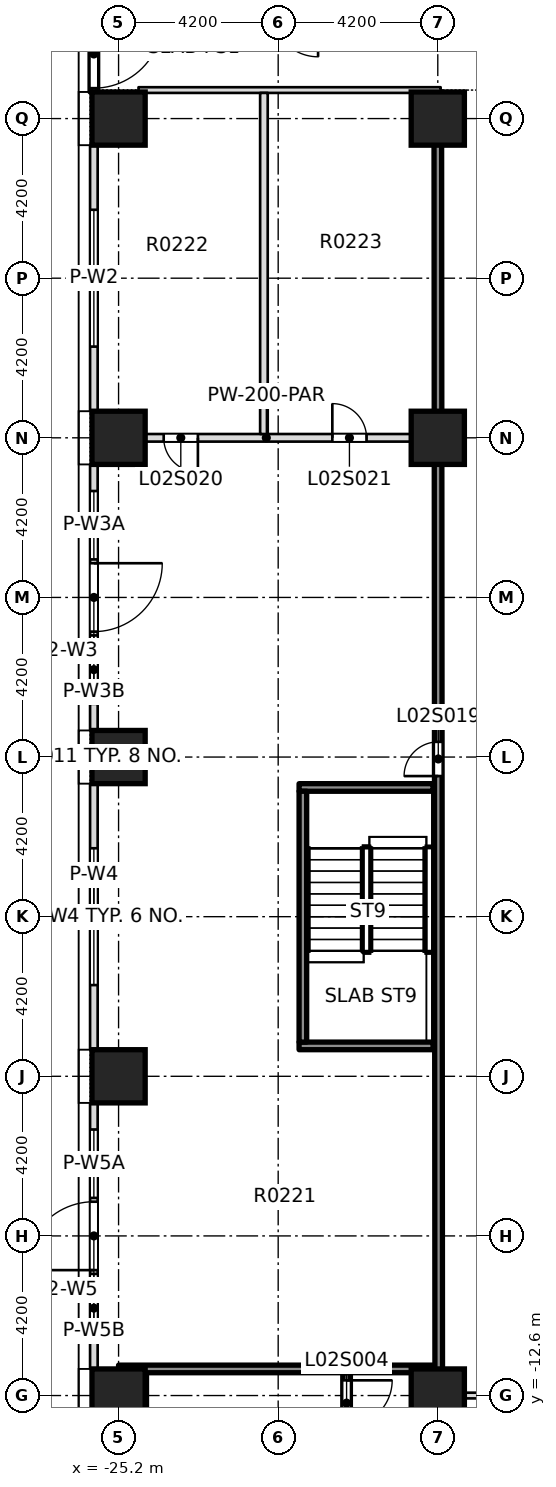
"""IFC4 building model, lengths in metres.
Left out: names, types, materials, properties, quantities, classifications, styles, units other than length and angle.
Written with IfcOpenShell. Run it as: python <this file> out.ifc"""

import sys

from ifc_helpers import new_model, si_unit, direction, frame, frame_2d, origin, origin_2d, place, context, subcontext, project, spatial, rectangle, extrude, element, fill, save


model = new_model("IFC4")
c1 = context("Model", 3, precision=1e-05, world=origin(), true_north=direction((0.0, 1.0)))
c2 = subcontext(c1, "Body", "Model", "MODEL_VIEW")
j1 = project(units=[si_unit("LENGTHUNIT", "METRE"), si_unit("PLANEANGLEUNIT", "RADIAN")], contexts=[c1])
p1 = place(None, origin())
s1 = spatial("IfcSite", under=j1, at=p1, CompositionType="ELEMENT")
p2 = place(p1, origin())
s2 = spatial("IfcBuilding", under=s1, at=p2, CompositionType="ELEMENT")
p3 = place(p2, frame((0.0, 0.0, 12.5)))
s3 = spatial("IfcBuildingStorey", under=s2, at=p3, CompositionType="ELEMENT", Elevation=12.5)
for number, where, z_axis, x_axis in (
    (1, (-25.2, -12.6, -0.4), (0.0, 0.0, 1.0), (1.0, 0.0, 0.0)),
    (2, (-16.8, -12.6, -0.4), (0.0, 0.0, 1.0), (1.0, 0.0, 0.0)),
    (3, (-25.2, -4.2, -0.4), (0.0, 0.0, 1.0), (1.0, 0.0, 0.0)),
    (4, (-25.2, 4.2, -0.4), (0.0, 0.0, 1.0), (1.0, 0.0, 0.0)),
    (5, (-25.2, 12.6, -0.4), (0.0, 0.0, 1.0), (1.0, 0.0, 0.0)),
    (6, (-16.8, 12.6, -0.4), (0.0, 0.0, 1.0), (1.0, 0.0, 0.0)),
    (7, (-16.8, 21.0, -0.4), (0.0, 0.0, 1.0), (1.0, 0.0, 0.0)),
    (8, (-25.2, 21.0, 0.0), (0.0, 0.0, 1.0), (1.0, 0.0, 0.0)),
):
    element("IfcColumn", number, at=place(p3, frame(where, z_axis=z_axis, x_axis=x_axis)), inside=s3, PredefinedType="COLUMN", context=c2, shape_type="SweptSolid", body=[
        extrude(rectangle(XDim=1.4, YDim=1.4, at=origin_2d()), origin(), (0.0, 0.0, 1.0), 7.5),
    ])
p4 = place(p3, frame((-16.9, -12.6, 0.0), z_axis=(0.0, 0.0, 1.0), x_axis=(1.0, 0.0, 0.0)))
e9 = element("IfcWall", 9, at=p4, inside=s3, PredefinedType="PARTITIONING", context=c2, shape_type="SweptSolid", body=[
    extrude(rectangle(XDim=9.625, YDim=0.15, at=frame_2d((4.812, 0.0))), origin(), (0.0, 0.0, 1.0), 7.1),
])
p5 = place(p3, frame((-25.2, -11.9, 0.0), z_axis=(0.0, 0.0, 1.0), x_axis=(1.0, 0.0, 0.0)))
e10 = element("IfcWall", 10, at=p5, inside=s3, PredefinedType="SOLIDWALL", context=c2, shape_type="SweptSolid", body=[
    extrude(rectangle(XDim=8.325, YDim=0.2, at=frame_2d((4.163, 0.0))), origin(), (0.0, 0.0, 1.0), 7.1),
])
p6 = place(p3, frame((-25.75, 12.6, 0.0), z_axis=(0.0, 0.0, 1.0), x_axis=(1.0, 0.0, 0.0)))
e11 = element("IfcWall", 11, at=p6, inside=s3, PredefinedType="PARTITIONING", context=c2, shape_type="SweptSolid", body=[
    extrude(rectangle(XDim=8.875, YDim=0.2, at=frame_2d((4.438, 0.0))), origin(), (0.0, 0.0, 1.0), 7.1),
])
p7 = place(p6, frame((1.738, 0.0, 0.0)))
e12 = element("IfcOpeningElement", 12, at=p7, cuts=e11, PredefinedType="OPENING", context=c2, shape_type="SweptSolid", body=[
    extrude(rectangle(XDim=0.9, YDim=2.1, at=frame_2d((0.45, 1.05))), frame((0.0, 0.11, 0.0), z_axis=(0.0, -1.0, 0.0), x_axis=(1.0, 0.0, 0.0)), (0.0, 0.0, 1.0), 0.22),
])
p8 = place(p6, frame((6.175, 0.0, 0.0)))
e13 = element("IfcOpeningElement", 13, at=p8, cuts=e11, PredefinedType="OPENING", context=c2, shape_type="SweptSolid", body=[
    extrude(rectangle(XDim=0.9, YDim=2.1, at=frame_2d((0.45, 1.05))), frame((0.0, 0.11, 0.0), z_axis=(0.0, -1.0, 0.0), x_axis=(1.0, 0.0, 0.0)), (0.0, 0.0, 1.0), 0.22),
])
p9 = place(p3, frame((-24.675, 21.75, 0.0), z_axis=(0.0, 0.0, 1.0), x_axis=(1.0, 0.0, 0.0)))
e14 = element("IfcWall", 14, at=p9, inside=s3, PredefinedType="PARTITIONING", context=c2, shape_type="SweptSolid", body=[
    extrude(rectangle(XDim=7.95, YDim=0.15, at=frame_2d((3.975, 0.0))), origin(), (0.0, 0.0, 1.0), 7.1),
])
p10 = place(p3, frame((-21.375, 12.7, 0.0), z_axis=(0.0, 0.0, 1.0), x_axis=(0.0, 1.0, 0.0)))
e15 = element("IfcWall", 15, at=p10, inside=s3, PredefinedType="PARTITIONING", context=c2, shape_type="SweptSolid", body=[
    extrude(rectangle(XDim=8.975, YDim=0.2, at=frame_2d((4.488, 0.0))), origin(), (0.0, 0.0, 1.0), 7.1),
])
p11 = place(p3, frame((-19.2, -18.125, 0.0), z_axis=(0.0, 0.0, 1.0), x_axis=(0.0, 1.0, 0.0)))
e16 = element("IfcWall", 16, at=p11, inside=s3, PredefinedType="SOLIDWALL", context=c2, shape_type="SweptSolid", body=[
    extrude(rectangle(XDim=6.125, YDim=0.2, at=frame_2d((3.062, 0.0))), origin(), (0.0, 0.0, 1.0), 7.1),
])
p12 = place(p11, frame((4.725, 0.0, 0.0)))
e17 = element("IfcOpeningElement", 17, at=p12, cuts=e16, PredefinedType="OPENING", context=c2, shape_type="SweptSolid", body=[
    extrude(rectangle(XDim=1.2, YDim=2.1, at=frame_2d((0.6, 1.05))), frame((0.0, 0.11, 0.0), z_axis=(0.0, -1.0, 0.0), x_axis=(1.0, 0.0, 0.0)), (0.0, 0.0, 1.0), 0.22),
])
p13 = place(p3, frame((-16.8, -18.125, 0.0), z_axis=(0.0, 0.0, 1.0), x_axis=(0.0, 1.0, 0.0)))
e18 = element("IfcWall", 18, at=p13, inside=s3, PredefinedType="PARTITIONING", context=c2, shape_type="SweptSolid", body=[
    extrude(rectangle(XDim=5.45, YDim=0.2, at=frame_2d((2.725, 0.0))), origin(), (0.0, 0.0, 1.0), 7.1),
])
p14 = place(p3, frame((-16.775, -12.525, 0.0), z_axis=(0.0, 0.0, 1.0), x_axis=(-0.000727609751, 0.999999735292, 0.0)))
e19 = element("IfcWall", 19, at=p14, inside=s3, PredefinedType="SOLIDWALL", context=c2, shape_type="SweptSolid", body=[
    extrude(rectangle(XDim=34.225, YDim=0.2, at=frame_2d((17.112, 0.0))), origin(), (0.0, 0.0, 1.0), 7.1),
])
p15 = place(p14, frame((16.225, 0.0, 0.0)))
e20 = element("IfcOpeningElement", 20, at=p15, cuts=e19, PredefinedType="OPENING", context=c2, shape_type="SweptSolid", body=[
    extrude(rectangle(XDim=0.9, YDim=2.1, at=frame_2d((0.45, 1.05))), frame((0.0, 0.11, 0.0), z_axis=(0.0, -1.0, 0.0), x_axis=(1.0, 0.0, 0.0)), (0.0, 0.0, 1.0), 0.22),
])
p16 = place(p3, frame((-25.85, 21.7, 0.0), z_axis=(0.0, 0.0, 1.0), x_axis=(0.0, 1.0, 0.0)))
e21 = element("IfcWall", 21, at=p16, inside=s3, PredefinedType="SOLIDWALL", context=c2, shape_type="SweptSolid", body=[
    extrude(rectangle(XDim=7.0, YDim=0.2, at=frame_2d((3.5, 0.0))), origin(), (0.0, 0.0, 1.0), 7.1),
])
p17 = place(p16, frame((0.1, 0.0, 0.0)))
e22 = element("IfcOpeningElement", 22, at=p17, cuts=e21, PredefinedType="OPENING", context=c2, shape_type="SweptSolid", body=[
    extrude(rectangle(XDim=1.8, YDim=2.4, at=frame_2d((0.9, 1.2))), frame((0.0, 0.11, 0.0), z_axis=(0.0, -1.0, 0.0), x_axis=(1.0, 0.0, 0.0)), (0.0, 0.0, 1.0), 0.22),
])
p18 = place(p16, frame((3.9, 0.0, 0.9)))
e23 = element("IfcOpeningElement", 23, at=p18, cuts=e21, PredefinedType="OPENING", context=c2, shape_type="SweptSolid", body=[
    extrude(rectangle(XDim=1.8, YDim=4.2, at=frame_2d((0.9, 2.1))), frame((0.0, 0.11, 0.0), z_axis=(0.0, -1.0, 0.0), x_axis=(1.0, 0.0, 0.0)), (0.0, 0.0, 1.0), 0.22),
])
p19 = place(p3, frame((-25.85, 20.3, 0.0), z_axis=(0.0, 0.0, 1.0), x_axis=(0.0, -1.0, 0.0)))
e24 = element("IfcWall", 24, at=p19, inside=s3, PredefinedType="STANDARD", context=c2, shape_type="SweptSolid", body=[
    extrude(rectangle(XDim=7.0, YDim=0.2, at=frame_2d((3.5, 0.0))), origin(), (0.0, 0.0, 1.0), 7.1),
])
p20 = place(p19, frame((1.7, 0.0, 0.9)))
e25 = element("IfcOpeningElement", 25, at=p20, cuts=e24, PredefinedType="OPENING", context=c2, shape_type="SweptSolid", body=[
    extrude(rectangle(XDim=3.6, YDim=4.2, at=frame_2d((1.8, 2.1))), frame((0.0, 0.11, 0.0), z_axis=(0.0, -1.0, 0.0), x_axis=(1.0, 0.0, 0.0)), (0.0, 0.0, 1.0), 0.22),
])
p21 = place(p3, frame((-25.85, 11.9, 0.0), z_axis=(0.0, 0.0, 1.0), x_axis=(0.0, -1.0, 0.0)))
e26 = element("IfcWall", 26, at=p21, inside=s3, PredefinedType="STANDARD", context=c2, shape_type="SweptSolid", body=[
    extrude(rectangle(XDim=7.0, YDim=0.2, at=frame_2d((3.5, 0.0))), origin(), (0.0, 0.0, 1.0), 7.1),
])
p22 = place(p21, frame((0.7, 0.0, 0.9)))
e27 = element("IfcOpeningElement", 27, at=p22, cuts=e26, PredefinedType="OPENING", context=c2, shape_type="SweptSolid", body=[
    extrude(rectangle(XDim=1.8, YDim=4.2, at=frame_2d((0.9, 2.1))), frame((0.0, 0.11, 0.0), z_axis=(0.0, -1.0, 0.0), x_axis=(1.0, 0.0, 0.0)), (0.0, 0.0, 1.0), 0.22),
])
p23 = place(p21, frame((2.6, 0.0, 0.0)))
e28 = element("IfcOpeningElement", 28, at=p23, cuts=e26, PredefinedType="OPENING", context=c2, shape_type="SweptSolid", body=[
    extrude(rectangle(XDim=1.8, YDim=2.4, at=frame_2d((0.9, 1.2))), frame((0.0, 0.11, 0.0), z_axis=(0.0, -1.0, 0.0), x_axis=(1.0, 0.0, 0.0)), (0.0, 0.0, 1.0), 0.22),
])
p24 = place(p21, frame((4.5, 0.0, 0.9)))
e29 = element("IfcOpeningElement", 29, at=p24, cuts=e26, PredefinedType="OPENING", context=c2, shape_type="SweptSolid", body=[
    extrude(rectangle(XDim=1.8, YDim=4.2, at=frame_2d((0.9, 2.1))), frame((0.0, 0.11, 0.0), z_axis=(0.0, -1.0, 0.0), x_axis=(1.0, 0.0, 0.0)), (0.0, 0.0, 1.0), 0.22),
])
p25 = place(p3, frame((-25.85, 3.5, 0.0), z_axis=(0.0, 0.0, 1.0), x_axis=(0.0, -1.0, 0.0)))
e30 = element("IfcWall", 30, at=p25, inside=s3, PredefinedType="STANDARD", context=c2, shape_type="SweptSolid", body=[
    extrude(rectangle(XDim=7.0, YDim=0.2, at=frame_2d((3.5, 0.0))), origin(), (0.0, 0.0, 1.0), 7.1),
])
p26 = place(p25, frame((1.7, 0.0, 0.9)))
e31 = element("IfcOpeningElement", 31, at=p26, cuts=e30, PredefinedType="OPENING", context=c2, shape_type="SweptSolid", body=[
    extrude(rectangle(XDim=3.6, YDim=4.2, at=frame_2d((1.8, 2.1))), frame((0.0, 0.11, 0.0), z_axis=(0.0, -1.0, 0.0), x_axis=(1.0, 0.0, 0.0)), (0.0, 0.0, 1.0), 0.22),
])
p27 = place(p3, frame((-25.85, -4.9, 0.0), z_axis=(0.0, 0.0, 1.0), x_axis=(0.0, -1.0, 0.0)))
e32 = element("IfcWall", 32, at=p27, inside=s3, PredefinedType="STANDARD", context=c2, shape_type="SweptSolid", body=[
    extrude(rectangle(XDim=7.0, YDim=0.2, at=frame_2d((3.5, 0.0))), origin(), (0.0, 0.0, 1.0), 7.1),
])
p28 = place(p27, frame((0.7, 0.0, 0.9)))
e33 = element("IfcOpeningElement", 33, at=p28, cuts=e32, PredefinedType="OPENING", context=c2, shape_type="SweptSolid", body=[
    extrude(rectangle(XDim=1.8, YDim=4.2, at=frame_2d((0.9, 2.1))), frame((0.0, 0.11, 0.0), z_axis=(0.0, -1.0, 0.0), x_axis=(1.0, 0.0, 0.0)), (0.0, 0.0, 1.0), 0.22),
])
p29 = place(p27, frame((2.6, 0.0, 0.0)))
e34 = element("IfcOpeningElement", 34, at=p29, cuts=e32, PredefinedType="OPENING", context=c2, shape_type="SweptSolid", body=[
    extrude(rectangle(XDim=1.8, YDim=2.4, at=frame_2d((0.9, 1.2))), frame((0.0, 0.11, 0.0), z_axis=(0.0, -1.0, 0.0), x_axis=(1.0, 0.0, 0.0)), (0.0, 0.0, 1.0), 0.22),
])
p30 = place(p27, frame((4.5, 0.0, 0.9)))
e35 = element("IfcOpeningElement", 35, at=p30, cuts=e32, PredefinedType="OPENING", context=c2, shape_type="SweptSolid", body=[
    extrude(rectangle(XDim=1.8, YDim=4.2, at=frame_2d((0.9, 2.1))), frame((0.0, 0.11, 0.0), z_axis=(0.0, -1.0, 0.0), x_axis=(1.0, 0.0, 0.0)), (0.0, 0.0, 1.0), 0.22),
])
for number, where, z_axis, x_axis in (
    (36, (-20.45, -3.4, 0.0), (0.0, 0.0, 1.0), (1.0, 0.0, 0.0)),
    (37, (-20.45, 3.4, 0.0), (0.0, 0.0, 1.0), (1.0, 0.0, 0.0)),
):
    element("IfcWall", number, at=place(p3, frame(where, z_axis=z_axis, x_axis=x_axis)), inside=s3, PredefinedType="SOLIDWALL", context=c2, shape_type="SweptSolid", body=[
        extrude(rectangle(XDim=3.525, YDim=0.2, at=frame_2d((1.762, 0.0))), origin(), (0.0, 0.0, 1.0), 7.1),
    ])
p31 = place(p3, frame((-20.35, -3.3, 0.0), z_axis=(0.0, 0.0, 1.0), x_axis=(0.0, 1.0, 0.0)))
e38 = element("IfcWall", 38, at=p31, inside=s3, PredefinedType="SOLIDWALL", context=c2, shape_type="SweptSolid", body=[
    extrude(rectangle(XDim=6.6, YDim=0.2, at=frame_2d((3.3, 0.0))), origin(), (0.0, 0.0, 1.0), 7.1),
])
p32 = place(p12, origin())
e39 = element("IfcDoor", 39, at=p32, inside=s3, OperationType="DOUBLE_DOOR_SINGLE_SWING", PredefinedType="DOOR", context=c2, shape_type="SweptSolid", body=[
    extrude(rectangle(XDim=1.2, YDim=2.1, at=frame_2d((0.6, 1.05))), frame((0.0, 0.025, 0.0), z_axis=(0.0, -1.0, 0.0), x_axis=(1.0, 0.0, 0.0)), (0.0, 0.0, 1.0), 0.05),
])
fill(e17, e39)
p33 = place(p15, origin())
e40 = element("IfcDoor", 40, at=p33, inside=s3, OperationType="SINGLE_SWING_LEFT", PredefinedType="DOOR", context=c2, shape_type="SweptSolid", body=[
    extrude(rectangle(XDim=0.9, YDim=2.1, at=frame_2d((0.45, 1.05))), frame((0.0, 0.025, 0.0), z_axis=(0.0, -1.0, 0.0), x_axis=(1.0, 0.0, 0.0)), (0.0, 0.0, 1.0), 0.05),
])
fill(e20, e40)
p34 = place(p7, origin())
e41 = element("IfcDoor", 41, at=p34, inside=s3, OperationType="SINGLE_SWING_RIGHT", PredefinedType="DOOR", context=c2, shape_type="SweptSolid", body=[
    extrude(rectangle(XDim=0.9, YDim=2.1, at=frame_2d((0.45, 1.05))), frame((0.0, 0.025, 0.0), z_axis=(0.0, -1.0, 0.0), x_axis=(1.0, 0.0, 0.0)), (0.0, 0.0, 1.0), 0.05),
])
fill(e12, e41)
p35 = place(p8, origin())
e42 = element("IfcDoor", 42, at=p35, inside=s3, OperationType="SINGLE_SWING_LEFT", PredefinedType="DOOR", context=c2, shape_type="SweptSolid", body=[
    extrude(rectangle(XDim=0.9, YDim=2.1, at=frame_2d((0.45, 1.05))), frame((0.0, 0.025, 0.0), z_axis=(0.0, -1.0, 0.0), x_axis=(1.0, 0.0, 0.0)), (0.0, 0.0, 1.0), 0.05),
])
fill(e13, e42)
p36 = place(p17, origin())
e43 = element("IfcDoor", 43, at=p36, inside=s3, OperationType="SINGLE_SWING_LEFT", PredefinedType="DOOR", context=c2, shape_type="SweptSolid", body=[
    extrude(rectangle(XDim=1.8, YDim=2.4, at=frame_2d((0.9, 1.2))), frame((0.0, 0.025, 0.0), z_axis=(0.0, -1.0, 0.0), x_axis=(1.0, 0.0, 0.0)), (0.0, 0.0, 1.0), 0.05),
])
fill(e22, e43)
p37 = place(p20, origin())
e44 = element("IfcWindow", 44, at=p37, inside=s3, PartitioningType="SINGLE_PANEL", PredefinedType="WINDOW", context=c2, shape_type="SweptSolid", body=[
    extrude(rectangle(XDim=3.6, YDim=4.2, at=frame_2d((1.8, 2.1))), frame((0.0, 0.03, 0.0), z_axis=(0.0, -1.0, 0.0), x_axis=(1.0, 0.0, 0.0)), (0.0, 0.0, 1.0), 0.06),
])
fill(e25, e44)
p38 = place(p22, origin())
e45 = element("IfcWindow", 45, at=p38, inside=s3, PartitioningType="SINGLE_PANEL", PredefinedType="WINDOW", context=c2, shape_type="SweptSolid", body=[
    extrude(rectangle(XDim=1.8, YDim=4.2, at=frame_2d((0.9, 2.1))), frame((0.0, 0.03, 0.0), z_axis=(0.0, -1.0, 0.0), x_axis=(1.0, 0.0, 0.0)), (0.0, 0.0, 1.0), 0.06),
])
fill(e27, e45)
p39 = place(p23, origin())
e46 = element("IfcDoor", 46, at=p39, inside=s3, OperationType="SINGLE_SWING_LEFT", PredefinedType="DOOR", context=c2, shape_type="SweptSolid", body=[
    extrude(rectangle(XDim=1.8, YDim=2.4, at=frame_2d((0.9, 1.2))), frame((0.0, 0.025, 0.0), z_axis=(0.0, -1.0, 0.0), x_axis=(1.0, 0.0, 0.0)), (0.0, 0.0, 1.0), 0.05),
])
fill(e28, e46)
p40 = place(p24, origin())
e47 = element("IfcWindow", 47, at=p40, inside=s3, PartitioningType="SINGLE_PANEL", PredefinedType="WINDOW", context=c2, shape_type="SweptSolid", body=[
    extrude(rectangle(XDim=1.8, YDim=4.2, at=frame_2d((0.9, 2.1))), frame((0.0, 0.03, 0.0), z_axis=(0.0, -1.0, 0.0), x_axis=(1.0, 0.0, 0.0)), (0.0, 0.0, 1.0), 0.06),
])
fill(e29, e47)
p41 = place(p26, origin())
e48 = element("IfcWindow", 48, at=p41, inside=s3, PartitioningType="SINGLE_PANEL", PredefinedType="WINDOW", context=c2, shape_type="SweptSolid", body=[
    extrude(rectangle(XDim=3.6, YDim=4.2, at=frame_2d((1.8, 2.1))), frame((0.0, 0.03, 0.0), z_axis=(0.0, -1.0, 0.0), x_axis=(1.0, 0.0, 0.0)), (0.0, 0.0, 1.0), 0.06),
])
fill(e31, e48)
p42 = place(p28, origin())
e49 = element("IfcWindow", 49, at=p42, inside=s3, PartitioningType="SINGLE_PANEL", PredefinedType="WINDOW", context=c2, shape_type="SweptSolid", body=[
    extrude(rectangle(XDim=1.8, YDim=4.2, at=frame_2d((0.9, 2.1))), frame((0.0, 0.03, 0.0), z_axis=(0.0, -1.0, 0.0), x_axis=(1.0, 0.0, 0.0)), (0.0, 0.0, 1.0), 0.06),
])
fill(e33, e49)
p43 = place(p29, origin())
e50 = element("IfcDoor", 50, at=p43, inside=s3, OperationType="SINGLE_SWING_LEFT", PredefinedType="DOOR", context=c2, shape_type="SweptSolid", body=[
    extrude(rectangle(XDim=1.8, YDim=2.4, at=frame_2d((0.9, 1.2))), frame((0.0, 0.025, 0.0), z_axis=(0.0, -1.0, 0.0), x_axis=(1.0, 0.0, 0.0)), (0.0, 0.0, 1.0), 0.05),
])
fill(e34, e50)
p44 = place(p30, origin())
e51 = element("IfcWindow", 51, at=p44, inside=s3, PartitioningType="SINGLE_PANEL", PredefinedType="WINDOW", context=c2, shape_type="SweptSolid", body=[
    extrude(rectangle(XDim=1.8, YDim=4.2, at=frame_2d((0.9, 2.1))), frame((0.0, 0.03, 0.0), z_axis=(0.0, -1.0, 0.0), x_axis=(1.0, 0.0, 0.0)), (0.0, 0.0, 1.0), 0.06),
])
fill(e35, e51)
save(model, sys.argv[1])
